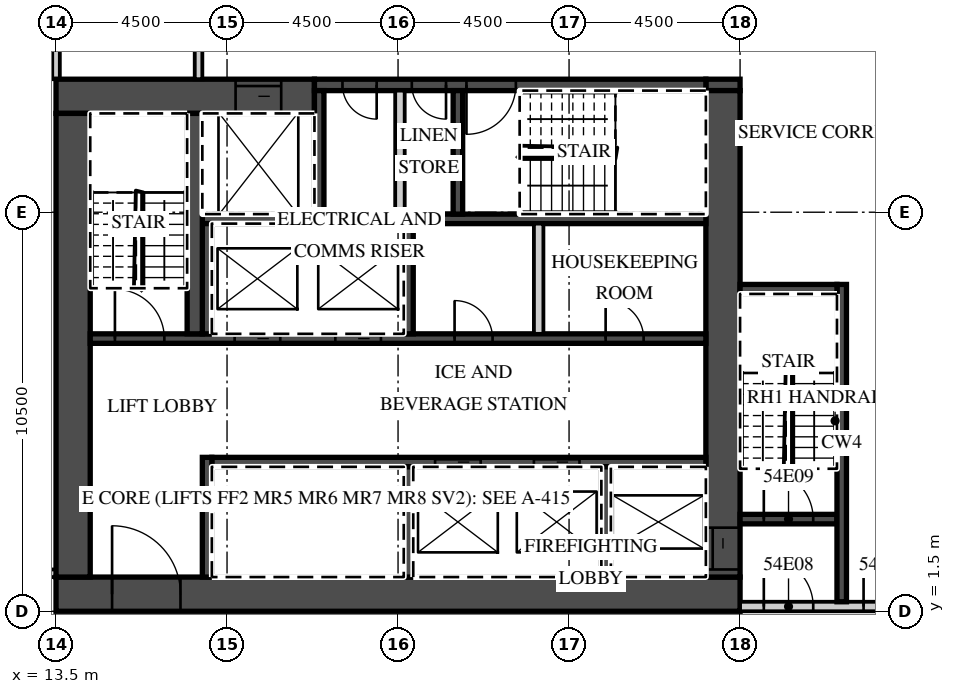
"""IFC4 building model, lengths in metres.
Left out: names, types, materials, properties, quantities, classifications, styles, units other than length and angle.
Written with IfcOpenShell. Run it as: python <this file> out.ifc"""

import sys

from ifc_helpers import new_model, si_unit, direction, frame, frame_2d, origin, place, context, subcontext, project, spatial, rectangle, extrude, element, fill, save


model = new_model("IFC4")
c1 = context("Model", 3, precision=1e-05, world=origin(), true_north=direction((0.0, 1.0)))
c2 = subcontext(c1, "Body", "Model", "MODEL_VIEW")
j1 = project(units=[si_unit("LENGTHUNIT", "METRE"), si_unit("PLANEANGLEUNIT", "RADIAN")], contexts=[c1])
p1 = place(None, origin())
s1 = spatial("IfcSite", under=j1, at=p1, CompositionType="ELEMENT")
p2 = place(p1, origin())
s2 = spatial("IfcBuilding", under=s1, at=p2, CompositionType="ELEMENT")
p3 = place(p2, frame((0.0, 0.0, 224.3)))
s3 = spatial("IfcBuildingStorey", under=s2, at=p3, CompositionType="ELEMENT", Elevation=224.3)
p4 = place(p3, frame((13.5, 15.5, 0.0), z_axis=(0.0, 0.0, 1.0), x_axis=(0.0, 1.0, 0.0)))
e1 = element("IfcWall", 1, at=p4, inside=s3, PredefinedType="PARTITIONING", context=c2, shape_type="SweptSolid", body=[
    extrude(rectangle(XDim=5.436, YDim=0.2, at=frame_2d((2.718, 0.0))), origin(), (0.0, 0.0, 1.0), 3.02),
])
p5 = place(p3, frame((-13.5, 2.5, 0.0), z_axis=(0.0, 0.0, 1.0), x_axis=(1.0, 0.0, 0.0)))
e2 = element("IfcWall", 2, at=p5, inside=s3, PredefinedType="PARTITIONING", context=c2, shape_type="SweptSolid", body=[
    extrude(rectangle(XDim=27.0, YDim=0.2, at=frame_2d((13.5, 0.0))), origin(), (0.0, 0.0, 1.0), 3.02),
])
p6 = place(p5, frame((2.925, 0.0, 0.0)))
e3 = element("IfcOpeningElement", 3, at=p6, cuts=e2, PredefinedType="OPENING", context=c2, shape_type="SweptSolid", body=[
    extrude(rectangle(XDim=1.0, YDim=2.1, at=frame_2d((0.5, 1.05))), frame((0.0, 0.11, 0.0), z_axis=(0.0, -1.0, 0.0), x_axis=(1.0, 0.0, 0.0)), (0.0, 0.0, 1.0), 0.22),
])
p7 = place(p5, frame((7.45, 0.0, 0.0)))
e4 = element("IfcOpeningElement", 4, at=p7, cuts=e2, PredefinedType="OPENING", context=c2, shape_type="SweptSolid", body=[
    extrude(rectangle(XDim=1.0, YDim=2.1, at=frame_2d((0.5, 1.05))), frame((0.0, 0.11, 0.0), z_axis=(0.0, -1.0, 0.0), x_axis=(1.0, 0.0, 0.0)), (0.0, 0.0, 1.0), 0.22),
])
p8 = place(p5, frame((11.925, 0.0, 0.0)))
e5 = element("IfcOpeningElement", 5, at=p8, cuts=e2, PredefinedType="OPENING", context=c2, shape_type="SweptSolid", body=[
    extrude(rectangle(XDim=1.0, YDim=2.1, at=frame_2d((0.5, 1.05))), frame((0.0, 0.11, 0.0), z_axis=(0.0, -1.0, 0.0), x_axis=(1.0, 0.0, 0.0)), (0.0, 0.0, 1.0), 0.22),
])
p9 = place(p5, frame((14.075, 0.0, 0.0)))
e6 = element("IfcOpeningElement", 6, at=p9, cuts=e2, PredefinedType="OPENING", context=c2, shape_type="SweptSolid", body=[
    extrude(rectangle(XDim=1.0, YDim=2.1, at=frame_2d((0.5, 1.05))), frame((0.0, 0.11, 0.0), z_axis=(0.0, -1.0, 0.0), x_axis=(1.0, 0.0, 0.0)), (0.0, 0.0, 1.0), 0.22),
])
p10 = place(p5, frame((20.925, 0.0, 0.0)))
e7 = element("IfcOpeningElement", 7, at=p10, cuts=e2, PredefinedType="OPENING", context=c2, shape_type="SweptSolid", body=[
    extrude(rectangle(XDim=1.0, YDim=2.1, at=frame_2d((0.5, 1.05))), frame((0.0, 0.11, 0.0), z_axis=(0.0, -1.0, 0.0), x_axis=(1.0, 0.0, 0.0)), (0.0, 0.0, 1.0), 0.22),
])
p11 = place(p5, frame((25.425, 0.0, 0.0)))
e8 = element("IfcOpeningElement", 8, at=p11, cuts=e2, PredefinedType="OPENING", context=c2, shape_type="SweptSolid", body=[
    extrude(rectangle(XDim=1.0, YDim=2.1, at=frame_2d((0.5, 1.05))), frame((0.0, 0.11, 0.0), z_axis=(0.0, -1.0, 0.0), x_axis=(1.0, 0.0, 0.0)), (0.0, 0.0, 1.0), 0.22),
])
p12 = place(p3, frame((13.5, 1.95, 0.0), z_axis=(0.0, 0.0, 1.0), x_axis=(1.0, 0.0, 0.0)))
e9 = element("IfcWall", 9, at=p12, inside=s3, PredefinedType="SHEAR", context=c2, shape_type="SweptSolid", body=[
    extrude(rectangle(XDim=18.0, YDim=0.9, at=frame_2d((9.0, 0.0))), origin(), (0.0, 0.0, 1.0), 3.02),
])
p13 = place(p12, frame((1.475, 0.0, 0.0)))
e10 = element("IfcOpeningElement", 10, at=p13, cuts=e9, PredefinedType="OPENING", context=c2, shape_type="SweptSolid", body=[
    extrude(rectangle(XDim=1.8, YDim=2.1, at=frame_2d((0.9, 1.05))), frame((0.0, 0.46, 0.0), z_axis=(0.0, -1.0, 0.0), x_axis=(1.0, 0.0, 0.0)), (0.0, 0.0, 1.0), 0.92),
])
p14 = place(p3, frame((13.5, 15.05, 0.0), z_axis=(0.0, 0.0, 1.0), x_axis=(1.0, 0.0, 0.0)))
e11 = element("IfcWall", 11, at=p14, inside=s3, PredefinedType="SHEAR", context=c2, shape_type="SweptSolid", body=[
    extrude(rectangle(XDim=6.8, YDim=0.9, at=frame_2d((3.4, 0.0))), origin(), (0.0, 0.0, 1.0), 3.02),
])
p15 = place(p14, frame((4.725, 0.0, 0.0)))
e12 = element("IfcOpeningElement", 12, at=p15, cuts=e11, PredefinedType="OPENING", context=c2, shape_type="SweptSolid", body=[
    extrude(rectangle(XDim=1.2, YDim=2.1, at=frame_2d((0.6, 1.05))), frame((0.0, 0.46, 0.0), z_axis=(0.0, -1.0, 0.0), x_axis=(1.0, 0.0, 0.0)), (0.0, 0.0, 1.0), 0.92),
])
p16 = place(p3, frame((30.6, 15.35, 0.0), z_axis=(0.0, 0.0, 1.0), x_axis=(1.0, 0.0, 0.0)))
e13 = element("IfcWall", 13, at=p16, inside=s3, PredefinedType="SHEAR", context=c2, shape_type="SweptSolid", body=[
    extrude(rectangle(XDim=0.9, YDim=0.3, at=frame_2d((0.45, 0.0))), origin(), (0.0, 0.0, 1.0), 3.02),
])
p17 = place(p3, frame((20.3, 15.35, 0.0), z_axis=(0.0, 0.0, 1.0), x_axis=(1.0, 0.0, 0.0)))
e14 = element("IfcWall", 14, at=p17, inside=s3, PredefinedType="SHEAR", context=c2, shape_type="SweptSolid", body=[
    extrude(rectangle(XDim=10.3, YDim=0.3, at=frame_2d((5.15, 0.0))), origin(), (0.0, 0.0, 1.0), 3.02),
])
p18 = place(p17, frame((4.0, 0.0, 0.0)))
e15 = element("IfcOpeningElement", 15, at=p18, cuts=e14, PredefinedType="OPENING", context=c2, shape_type="SweptSolid", body=[
    extrude(rectangle(XDim=1.3, YDim=2.1, at=frame_2d((0.65, 1.05))), frame((0.0, 0.16, 0.0), z_axis=(0.0, -1.0, 0.0), x_axis=(1.0, 0.0, 0.0)), (0.0, 0.0, 1.0), 0.32),
])
p19 = place(p17, frame((2.562, 0.0, 0.0)))
e16 = element("IfcOpeningElement", 16, at=p19, cuts=e14, PredefinedType="OPENING", context=c2, shape_type="SweptSolid", body=[
    extrude(rectangle(XDim=0.9, YDim=2.1, at=frame_2d((0.45, 1.05))), frame((0.0, 0.16, 0.0), z_axis=(0.0, -1.0, 0.0), x_axis=(1.0, 0.0, 0.0)), (0.0, 0.0, 1.0), 0.32),
])
p20 = place(p17, frame((0.738, 0.0, 0.0)))
e17 = element("IfcOpeningElement", 17, at=p20, cuts=e14, PredefinedType="OPENING", context=c2, shape_type="SweptSolid", body=[
    extrude(rectangle(XDim=0.9, YDim=2.1, at=frame_2d((0.45, 1.05))), frame((0.0, 0.16, 0.0), z_axis=(0.0, -1.0, 0.0), x_axis=(1.0, 0.0, 0.0)), (0.0, 0.0, 1.0), 0.32),
])
p21 = place(p3, frame((31.05, 2.4, 0.0), z_axis=(0.0, 0.0, 1.0), x_axis=(0.0, 1.0, 0.0)))
e18 = element("IfcWall", 18, at=p21, inside=s3, PredefinedType="SHEAR", context=c2, shape_type="SweptSolid", body=[
    extrude(rectangle(XDim=12.8, YDim=0.9, at=frame_2d((6.4, 0.0))), origin(), (0.0, 0.0, 1.0), 3.02),
])
p22 = place(p21, frame((0.2, 0.0, 0.0)))
e19 = element("IfcOpeningElement", 19, at=p22, cuts=e18, PredefinedType="OPENING", context=c2, shape_type="SweptSolid", body=[
    extrude(rectangle(XDim=1.1, YDim=2.1, at=frame_2d((0.55, 1.05))), frame((0.0, 0.46, 0.0), z_axis=(0.0, -1.0, 0.0), x_axis=(1.0, 0.0, 0.0)), (0.0, 0.0, 1.0), 0.92),
])
p23 = place(p3, frame((13.95, 2.4, 0.0), z_axis=(0.0, 0.0, 1.0), x_axis=(0.0, 1.0, 0.0)))
e20 = element("IfcWall", 20, at=p23, inside=s3, PredefinedType="SHEAR", context=c2, shape_type="SweptSolid", body=[
    extrude(rectangle(XDim=12.2, YDim=0.9, at=frame_2d((6.1, 0.0))), origin(), (0.0, 0.0, 1.0), 3.02),
])
p24 = place(p3, frame((17.6, 5.425, 0.0), z_axis=(0.0, 0.0, 1.0), x_axis=(1.0, 0.0, 0.0)))
e21 = element("IfcWall", 21, at=p24, inside=s3, PredefinedType="SHEAR", context=c2, shape_type="SweptSolid", body=[
    extrude(rectangle(XDim=13.0, YDim=0.25, at=frame_2d((6.5, 0.0))), origin(), (0.0, 0.0, 1.0), 3.02),
])
p25 = place(p24, frame((8.475, 0.0, 0.0)))
e22 = element("IfcOpeningElement", 22, at=p25, cuts=e21, PredefinedType="OPENING", context=c2, shape_type="SweptSolid", body=[
    extrude(rectangle(XDim=1.2, YDim=2.1, at=frame_2d((0.6, 1.05))), frame((0.0, 0.135, 0.0), z_axis=(0.0, -1.0, 0.0), x_axis=(1.0, 0.0, 0.0)), (0.0, 0.0, 1.0), 0.27),
])
p26 = place(p24, frame((5.875, 0.0, 0.0)))
e23 = element("IfcOpeningElement", 23, at=p26, cuts=e21, PredefinedType="OPENING", context=c2, shape_type="SweptSolid", body=[
    extrude(rectangle(XDim=1.2, YDim=2.1, at=frame_2d((0.6, 1.05))), frame((0.0, 0.135, 0.0), z_axis=(0.0, -1.0, 0.0), x_axis=(1.0, 0.0, 0.0)), (0.0, 0.0, 1.0), 0.27),
])
p27 = place(p3, frame((17.475, 2.4, 0.0), z_axis=(0.0, 0.0, 1.0), x_axis=(0.0, 1.0, 0.0)))
e24 = element("IfcWall", 24, at=p27, inside=s3, PredefinedType="SHEAR", context=c2, shape_type="SweptSolid", body=[
    extrude(rectangle(XDim=3.15, YDim=0.25, at=frame_2d((1.575, 0.0))), origin(), (0.0, 0.0, 1.0), 3.02),
])
for number, where, z_axis, x_axis in (
    (25, (27.975, 2.4, 0.0), (0.0, 0.0, 1.0), (0.0, 1.0, 0.0)),
    (26, (22.775, 2.4, 0.0), (0.0, 0.0, 1.0), (0.0, 1.0, 0.0)),
):
    element("IfcWall", number, at=place(p3, frame(where, z_axis=z_axis, x_axis=x_axis)), inside=s3, PredefinedType="SHEAR", context=c2, shape_type="SweptSolid", body=[
        extrude(rectangle(XDim=2.9, YDim=0.25, at=frame_2d((1.45, 0.0))), origin(), (0.0, 0.0, 1.0), 3.02),
    ])
p28 = place(p3, frame((14.4, 8.675, 0.0), z_axis=(0.0, 0.0, 1.0), x_axis=(1.0, 0.0, 0.0)))
e27 = element("IfcWall", 27, at=p28, inside=s3, PredefinedType="SHEAR", context=c2, shape_type="SweptSolid", body=[
    extrude(rectangle(XDim=16.2, YDim=0.25, at=frame_2d((8.1, 0.0))), origin(), (0.0, 0.0, 1.0), 3.02),
])
p29 = place(p28, frame((6.45, 0.0, 0.0)))
e28 = element("IfcOpeningElement", 28, at=p29, cuts=e27, PredefinedType="OPENING", context=c2, shape_type="SweptSolid", body=[
    extrude(rectangle(XDim=1.2, YDim=2.1, at=frame_2d((0.6, 1.05))), frame((0.0, 0.135, 0.0), z_axis=(0.0, -1.0, 0.0), x_axis=(1.0, 0.0, 0.0)), (0.0, 0.0, 1.0), 0.27),
])
p30 = place(p28, frame((3.8, 0.0, 0.0)))
e29 = element("IfcOpeningElement", 29, at=p30, cuts=e27, PredefinedType="OPENING", context=c2, shape_type="SweptSolid", body=[
    extrude(rectangle(XDim=1.2, YDim=2.1, at=frame_2d((0.6, 1.05))), frame((0.0, 0.135, 0.0), z_axis=(0.0, -1.0, 0.0), x_axis=(1.0, 0.0, 0.0)), (0.0, 0.0, 1.0), 0.27),
])
p31 = place(p28, frame((0.65, 0.0, 0.0)))
e30 = element("IfcOpeningElement", 30, at=p31, cuts=e27, PredefinedType="OPENING", context=c2, shape_type="SweptSolid", body=[
    extrude(rectangle(XDim=1.3, YDim=2.1, at=frame_2d((0.65, 1.05))), frame((0.0, 0.135, 0.0), z_axis=(0.0, -1.0, 0.0), x_axis=(1.0, 0.0, 0.0)), (0.0, 0.0, 1.0), 0.27),
])
p32 = place(p28, frame((13.562, 0.0, 0.0)))
e31 = element("IfcOpeningElement", 31, at=p32, cuts=e27, PredefinedType="OPENING", context=c2, shape_type="SweptSolid", body=[
    extrude(rectangle(XDim=1.0, YDim=2.1, at=frame_2d((0.5, 1.05))), frame((0.0, 0.135, 0.0), z_axis=(0.0, -1.0, 0.0), x_axis=(1.0, 0.0, 0.0)), (0.0, 0.0, 1.0), 0.27),
])
p33 = place(p28, frame((9.587, 0.0, 0.0)))
e32 = element("IfcOpeningElement", 32, at=p33, cuts=e27, PredefinedType="OPENING", context=c2, shape_type="SweptSolid", body=[
    extrude(rectangle(XDim=1.0, YDim=2.1, at=frame_2d((0.5, 1.05))), frame((0.0, 0.135, 0.0), z_axis=(0.0, -1.0, 0.0), x_axis=(1.0, 0.0, 0.0)), (0.0, 0.0, 1.0), 0.27),
])
p34 = place(p3, frame((17.35, 11.825, 0.0), z_axis=(0.0, 0.0, 1.0), x_axis=(1.0, 0.0, 0.0)))
e33 = element("IfcWall", 33, at=p34, inside=s3, PredefinedType="SHEAR", context=c2, shape_type="SweptSolid", body=[
    extrude(rectangle(XDim=13.25, YDim=0.25, at=frame_2d((6.625, 0.0))), origin(), (0.0, 0.0, 1.0), 3.02),
])
for number, where, z_axis, x_axis in (
    (34, (17.475, 8.8, 0.0), (0.0, 0.0, 1.0), (0.0, 1.0, 0.0)),
    (35, (22.775, 8.8, 0.0), (0.0, 0.0, 1.0), (0.0, 1.0, 0.0)),
):
    element("IfcWall", number, at=place(p3, frame(where, z_axis=z_axis, x_axis=x_axis)), inside=s3, PredefinedType="SHEAR", context=c2, shape_type="SweptSolid", body=[
        extrude(rectangle(XDim=2.9, YDim=0.25, at=frame_2d((1.45, 0.0))), origin(), (0.0, 0.0, 1.0), 3.02),
    ])
p35 = place(p3, frame((26.2, 8.8, 0.0), z_axis=(0.0, 0.0, 1.0), x_axis=(0.0, 1.0, 0.0)))
e36 = element("IfcWall", 36, at=p35, inside=s3, PredefinedType="PARTITIONING", context=c2, shape_type="SweptSolid", body=[
    extrude(rectangle(XDim=2.9, YDim=0.25, at=frame_2d((1.45, 0.0))), origin(), (0.0, 0.0, 1.0), 3.02),
])
p36 = place(p3, frame((17.15, 8.8, 0.0), z_axis=(0.0, 0.0, 1.0), x_axis=(0.0, 1.0, 0.0)))
e37 = element("IfcWall", 37, at=p36, inside=s3, PredefinedType="SHEAR", context=c2, shape_type="SweptSolid", body=[
    extrude(rectangle(XDim=5.8, YDim=0.4, at=frame_2d((2.9, 0.0))), origin(), (0.0, 0.0, 1.0), 3.02),
])
for number, where, z_axis, x_axis in (
    (38, (20.425, 11.95, 0.0), (0.0, 0.0, 1.0), (0.0, 1.0, 0.0)),
    (39, (24.075, 11.95, 0.0), (0.0, 0.0, 1.0), (0.0, 1.0, 0.0)),
):
    element("IfcWall", number, at=place(p3, frame(where, z_axis=z_axis, x_axis=x_axis)), inside=s3, PredefinedType="SHEAR", context=c2, shape_type="SweptSolid", body=[
        extrude(rectangle(XDim=3.25, YDim=0.25, at=frame_2d((1.625, 0.0))), origin(), (0.0, 0.0, 1.0), 3.02),
    ])
p37 = place(p3, frame((22.55, 11.95, 0.0), z_axis=(0.0, 0.0, 1.0), x_axis=(0.0, 1.0, 0.0)))
e40 = element("IfcWall", 40, at=p37, inside=s3, PredefinedType="PARTITIONING", context=c2, shape_type="SweptSolid", body=[
    extrude(rectangle(XDim=3.25, YDim=0.25, at=frame_2d((1.625, 0.0))), origin(), (0.0, 0.0, 1.0), 3.02),
])
p38 = place(p3, frame((31.5, 1.625, 0.0), z_axis=(0.0, 0.0, 1.0), x_axis=(1.0, 0.0, 0.0)))
e41 = element("IfcWall", 41, at=p38, inside=s3, PredefinedType="PARTITIONING", context=c2, shape_type="SweptSolid", body=[
    extrude(rectangle(XDim=11.04, YDim=0.25, at=frame_2d((5.52, 0.0))), origin(), (0.0, 0.0, 1.0), 3.02),
])
p39 = place(p38, frame((0.625, 0.0, 0.0)))
e42 = element("IfcOpeningElement", 42, at=p39, cuts=e41, PredefinedType="OPENING", context=c2, shape_type="SweptSolid", body=[
    extrude(rectangle(XDim=1.3, YDim=2.1, at=frame_2d((0.65, 1.05))), frame((0.0, 0.135, 0.0), z_axis=(0.0, -1.0, 0.0), x_axis=(1.0, 0.0, 0.0)), (0.0, 0.0, 1.0), 0.27),
])
p40 = place(p38, frame((3.25, 0.0, 0.0)))
e43 = element("IfcOpeningElement", 43, at=p40, cuts=e41, PredefinedType="OPENING", context=c2, shape_type="SweptSolid", body=[
    extrude(rectangle(XDim=1.1, YDim=2.1, at=frame_2d((0.55, 1.05))), frame((0.0, 0.135, 0.0), z_axis=(0.0, -1.0, 0.0), x_axis=(1.0, 0.0, 0.0)), (0.0, 0.0, 1.0), 0.27),
])
p41 = place(p3, frame((31.5, 3.925, 0.0), z_axis=(0.0, 0.0, 1.0), x_axis=(1.0, 0.0, 0.0)))
e44 = element("IfcWall", 44, at=p41, inside=s3, PredefinedType="SHEAR", context=c2, shape_type="SweptSolid", body=[
    extrude(rectangle(XDim=2.55, YDim=0.25, at=frame_2d((1.275, 0.0))), origin(), (0.0, 0.0, 1.0), 3.02),
])
p42 = place(p41, frame((0.625, 0.0, 0.0)))
e45 = element("IfcOpeningElement", 45, at=p42, cuts=e44, PredefinedType="OPENING", context=c2, shape_type="SweptSolid", body=[
    extrude(rectangle(XDim=1.3, YDim=2.1, at=frame_2d((0.65, 1.05))), frame((0.0, 0.135, 0.0), z_axis=(0.0, -1.0, 0.0), x_axis=(1.0, 0.0, 0.0)), (0.0, 0.0, 1.0), 0.27),
])
p43 = place(p3, frame((34.175, 1.75, 0.0), z_axis=(0.0, 0.0, 1.0), x_axis=(0.0, 1.0, 0.0)))
e46 = element("IfcWall", 46, at=p43, inside=s3, PredefinedType="SHEAR", context=c2, shape_type="SweptSolid", body=[
    extrude(rectangle(XDim=8.35, YDim=0.25, at=frame_2d((4.175, 0.0))), origin(), (0.0, 0.0, 1.0), 3.02),
])
p44 = place(p3, frame((31.5, 9.975, 0.0), z_axis=(0.0, 0.0, 1.0), x_axis=(1.0, 0.0, 0.0)))
e47 = element("IfcWall", 47, at=p44, inside=s3, PredefinedType="SHEAR", context=c2, shape_type="SweptSolid", body=[
    extrude(rectangle(XDim=2.55, YDim=0.25, at=frame_2d((1.275, 0.0))), origin(), (0.0, 0.0, 1.0), 3.02),
])
p45 = place(p3, frame((17.25, 15.5, 0.0), z_axis=(0.0, 0.0, 1.0), x_axis=(0.0, 1.0, 0.0)))
e48 = element("IfcWall", 48, at=p45, inside=s3, PredefinedType="PARTITIONING", context=c2, shape_type="SweptSolid", body=[
    extrude(rectangle(XDim=2.2, YDim=0.2, at=frame_2d((1.1, 0.0))), origin(), (0.0, 0.0, 1.0), 3.02),
])
p46 = place(p29, origin())
e49 = element("IfcDoor", 49, at=p46, inside=s3, OperationType="SLIDING_TO_LEFT", PredefinedType="DOOR", context=c2, shape_type="SweptSolid", body=[
    extrude(rectangle(XDim=1.2, YDim=2.1, at=frame_2d((0.6, 1.05))), frame((0.0, 0.025, 0.0), z_axis=(0.0, -1.0, 0.0), x_axis=(1.0, 0.0, 0.0)), (0.0, 0.0, 1.0), 0.05),
])
fill(e28, e49)
p47 = place(p30, origin())
e50 = element("IfcDoor", 50, at=p47, inside=s3, OperationType="SLIDING_TO_RIGHT", PredefinedType="DOOR", context=c2, shape_type="SweptSolid", body=[
    extrude(rectangle(XDim=1.2, YDim=2.1, at=frame_2d((0.6, 1.05))), frame((0.0, 0.025, 0.0), z_axis=(0.0, -1.0, 0.0), x_axis=(1.0, 0.0, 0.0)), (0.0, 0.0, 1.0), 0.05),
])
fill(e29, e50)
p48 = place(p25, origin())
e51 = element("IfcDoor", 51, at=p48, inside=s3, OperationType="SLIDING_TO_LEFT", PredefinedType="DOOR", context=c2, shape_type="SweptSolid", body=[
    extrude(rectangle(XDim=1.2, YDim=2.1, at=frame_2d((0.6, 1.05))), frame((0.0, 0.025, 0.0), z_axis=(0.0, -1.0, 0.0), x_axis=(1.0, 0.0, 0.0)), (0.0, 0.0, 1.0), 0.05),
])
fill(e22, e51)
p49 = place(p26, origin())
e52 = element("IfcDoor", 52, at=p49, inside=s3, OperationType="SLIDING_TO_RIGHT", PredefinedType="DOOR", context=c2, shape_type="SweptSolid", body=[
    extrude(rectangle(XDim=1.2, YDim=2.1, at=frame_2d((0.6, 1.05))), frame((0.0, 0.025, 0.0), z_axis=(0.0, -1.0, 0.0), x_axis=(1.0, 0.0, 0.0)), (0.0, 0.0, 1.0), 0.05),
])
fill(e23, e52)
p50 = place(p15, origin())
e53 = element("IfcDoor", 53, at=p50, inside=s3, OperationType="SLIDING_TO_LEFT", PredefinedType="DOOR", context=c2, shape_type="SweptSolid", body=[
    extrude(rectangle(XDim=1.2, YDim=2.1, at=frame_2d((0.6, 1.05))), frame((0.0, 0.025, 0.0), z_axis=(0.0, -1.0, 0.0), x_axis=(1.0, 0.0, 0.0)), (0.0, 0.0, 1.0), 0.05),
])
fill(e12, e53)
p51 = place(p22, origin())
e54 = element("IfcDoor", 54, at=p51, inside=s3, OperationType="SLIDING_TO_LEFT", PredefinedType="DOOR", context=c2, shape_type="SweptSolid", body=[
    extrude(rectangle(XDim=1.1, YDim=2.1, at=frame_2d((0.55, 1.05))), frame((0.0, 0.025, 0.0), z_axis=(0.0, -1.0, 0.0), x_axis=(1.0, 0.0, 0.0)), (0.0, 0.0, 1.0), 0.05),
])
fill(e19, e54)
p52 = place(p13, origin())
e55 = element("IfcDoor", 55, at=p52, inside=s3, OperationType="DOUBLE_DOOR_DOUBLE_SWING", PredefinedType="DOOR", context=c2, shape_type="SweptSolid", body=[
    extrude(rectangle(XDim=1.8, YDim=2.1, at=frame_2d((0.9, 1.05))), frame((0.0, 0.025, 0.0), z_axis=(0.0, -1.0, 0.0), x_axis=(1.0, 0.0, 0.0)), (0.0, 0.0, 1.0), 0.05),
])
fill(e10, e55)
p53 = place(p39, origin())
e56 = element("IfcDoor", 56, at=p53, inside=s3, OperationType="SINGLE_SWING_LEFT", PredefinedType="DOOR", context=c2, shape_type="SweptSolid", body=[
    extrude(rectangle(XDim=1.3, YDim=2.1, at=frame_2d((0.65, 1.05))), frame((0.0, 0.025, 0.0), z_axis=(0.0, -1.0, 0.0), x_axis=(1.0, 0.0, 0.0)), (0.0, 0.0, 1.0), 0.05),
])
fill(e42, e56)
p54 = place(p42, origin())
e57 = element("IfcDoor", 57, at=p54, inside=s3, OperationType="SINGLE_SWING_LEFT", PredefinedType="DOOR", context=c2, shape_type="SweptSolid", body=[
    extrude(rectangle(XDim=1.3, YDim=2.1, at=frame_2d((0.65, 1.05))), frame((0.0, 0.025, 0.0), z_axis=(0.0, -1.0, 0.0), x_axis=(1.0, 0.0, 0.0)), (0.0, 0.0, 1.0), 0.05),
])
fill(e45, e57)
p55 = place(p40, origin())
e58 = element("IfcDoor", 58, at=p55, inside=s3, OperationType="SINGLE_SWING_LEFT", PredefinedType="DOOR", context=c2, shape_type="SweptSolid", body=[
    extrude(rectangle(XDim=1.1, YDim=2.1, at=frame_2d((0.55, 1.05))), frame((0.0, 0.025, 0.0), z_axis=(0.0, -1.0, 0.0), x_axis=(1.0, 0.0, 0.0)), (0.0, 0.0, 1.0), 0.05),
])
fill(e43, e58)
p56 = place(p31, origin())
e59 = element("IfcDoor", 59, at=p56, inside=s3, OperationType="SINGLE_SWING_LEFT", PredefinedType="DOOR", context=c2, shape_type="SweptSolid", body=[
    extrude(rectangle(XDim=1.3, YDim=2.1, at=frame_2d((0.65, 1.05))), frame((0.0, 0.025, 0.0), z_axis=(0.0, -1.0, 0.0), x_axis=(1.0, 0.0, 0.0)), (0.0, 0.0, 1.0), 0.05),
])
fill(e30, e59)
p57 = place(p18, origin())
e60 = element("IfcDoor", 60, at=p57, inside=s3, OperationType="SINGLE_SWING_LEFT", PredefinedType="DOOR", context=c2, shape_type="SweptSolid", body=[
    extrude(rectangle(XDim=1.3, YDim=2.1, at=frame_2d((0.65, 1.05))), frame((0.0, 0.025, 0.0), z_axis=(0.0, -1.0, 0.0), x_axis=(1.0, 0.0, 0.0)), (0.0, 0.0, 1.0), 0.05),
])
fill(e15, e60)
p58 = place(p19, origin())
e61 = element("IfcDoor", 61, at=p58, inside=s3, OperationType="SINGLE_SWING_RIGHT", PredefinedType="DOOR", context=c2, shape_type="SweptSolid", body=[
    extrude(rectangle(XDim=0.9, YDim=2.1, at=frame_2d((0.45, 1.05))), frame((0.0, 0.025, 0.0), z_axis=(0.0, -1.0, 0.0), x_axis=(1.0, 0.0, 0.0)), (0.0, 0.0, 1.0), 0.05),
])
fill(e16, e61)
p59 = place(p20, origin())
e62 = element("IfcDoor", 62, at=p59, inside=s3, OperationType="SINGLE_SWING_RIGHT", PredefinedType="DOOR", context=c2, shape_type="SweptSolid", body=[
    extrude(rectangle(XDim=0.9, YDim=2.1, at=frame_2d((0.45, 1.05))), frame((0.0, 0.025, 0.0), z_axis=(0.0, -1.0, 0.0), x_axis=(1.0, 0.0, 0.0)), (0.0, 0.0, 1.0), 0.05),
])
fill(e17, e62)
p60 = place(p32, origin())
e63 = element("IfcDoor", 63, at=p60, inside=s3, OperationType="SINGLE_SWING_LEFT", PredefinedType="DOOR", context=c2, shape_type="SweptSolid", body=[
    extrude(rectangle(XDim=1.0, YDim=2.1, at=frame_2d((0.5, 1.05))), frame((0.0, 0.025, 0.0), z_axis=(0.0, -1.0, 0.0), x_axis=(1.0, 0.0, 0.0)), (0.0, 0.0, 1.0), 0.05),
])
fill(e31, e63)
p61 = place(p33, origin())
e64 = element("IfcDoor", 64, at=p61, inside=s3, OperationType="SINGLE_SWING_LEFT", PredefinedType="DOOR", context=c2, shape_type="SweptSolid", body=[
    extrude(rectangle(XDim=1.0, YDim=2.1, at=frame_2d((0.5, 1.05))), frame((0.0, 0.025, 0.0), z_axis=(0.0, -1.0, 0.0), x_axis=(1.0, 0.0, 0.0)), (0.0, 0.0, 1.0), 0.05),
])
fill(e32, e64)
save(model, sys.argv[1])
